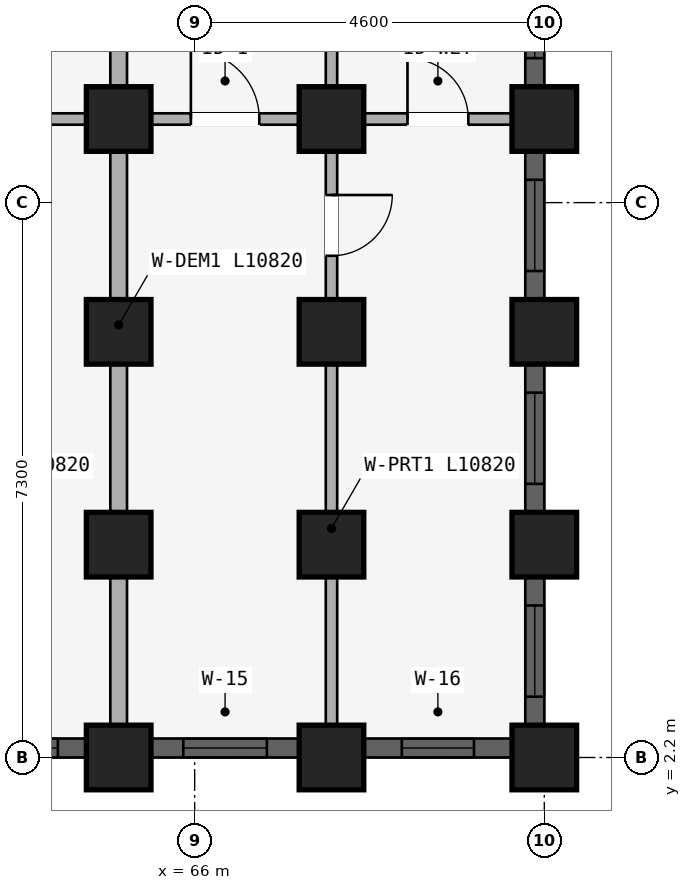
"""IFC4 building model, lengths in metres.
Left out: names, types, materials, properties, quantities, classifications, styles, units other than length and angle.
Written with IfcOpenShell. Run it as: python <this file> out.ifc"""

import sys

from ifc_helpers import new_model, si_unit, direction, frame, frame_2d, origin, origin_2d, place, context, subcontext, project, spatial, rectangle, extrude, element, fill, save


model = new_model("IFC4")
c1 = context("Model", 3, precision=1e-05, world=origin(), true_north=direction((0.0, 1.0)))
c2 = subcontext(c1, "Body", "Model", "MODEL_VIEW")
j1 = project(units=[si_unit("LENGTHUNIT", "METRE"), si_unit("PLANEANGLEUNIT", "RADIAN")], contexts=[c1])
p1 = place(None, origin())
s1 = spatial("IfcSite", under=j1, at=p1, CompositionType="ELEMENT")
p2 = place(p1, origin())
s2 = spatial("IfcBuilding", under=s1, at=p2, CompositionType="ELEMENT")
p3 = place(p2, frame((0.0, 0.0, 4.5)))
s3 = spatial("IfcBuildingStorey", under=s2, at=p3, CompositionType="ELEMENT", Elevation=4.5)
for number, where, z_axis, x_axis in (
    (1, (65.0, 10.6, 0.0), (0.0, 0.0, 1.0), (1.0, 0.0, 0.0)),
    (2, (65.0, 7.8, 0.0), (0.0, 0.0, 1.0), (1.0, 0.0, 0.0)),
    (3, (65.0, 5.0, 0.0), (0.0, 0.0, 1.0), (1.0, 0.0, 0.0)),
    (4, (65.0, 2.2, 0.0), (0.0, 0.0, 1.0), (1.0, 0.0, 0.0)),
    (5, (67.8, 10.6, 0.0), (0.0, 0.0, 1.0), (1.0, 0.0, 0.0)),
    (6, (67.8, 7.8, 0.0), (0.0, 0.0, 1.0), (1.0, 0.0, 0.0)),
    (7, (67.8, 5.0, 0.0), (0.0, 0.0, 1.0), (1.0, 0.0, 0.0)),
    (8, (67.8, 2.2, 0.0), (0.0, 0.0, 1.0), (1.0, 0.0, 0.0)),
    (9, (70.6, 10.6, 0.0), (0.0, 0.0, 1.0), (1.0, 0.0, 0.0)),
    (10, (70.6, 7.8, 0.0), (0.0, 0.0, 1.0), (1.0, 0.0, 0.0)),
    (11, (70.6, 5.0, 0.0), (0.0, 0.0, 1.0), (1.0, 0.0, 0.0)),
    (12, (70.6, 2.2, 0.0), (0.0, 0.0, 1.0), (1.0, 0.0, 0.0)),
):
    element("IfcColumn", number, at=place(p3, frame(where, z_axis=z_axis, x_axis=x_axis)), inside=s3, PredefinedType="COLUMN", context=c2, shape_type="SweptSolid", body=[
        extrude(rectangle(XDim=0.85, YDim=0.85, at=origin_2d()), origin(), (0.0, 0.0, 1.0), 3.98),
    ])
p4 = place(p3, frame((62.28, 10.6, 0.0), z_axis=(0.0, 0.0, 1.0), x_axis=(1.0, 0.0, 0.0)))
e13 = element("IfcWall", 13, at=p4, inside=s3, PredefinedType="PLUMBINGWALL", context=c2, shape_type="SweptSolid", body=[
    extrude(rectangle(XDim=2.64, YDim=0.15, at=frame_2d((1.32, 0.0))), origin(), (0.0, 0.0, 1.0), 3.322),
])
p5 = place(p4, frame((0.92, 0.0, 0.0)))
e14 = element("IfcOpeningElement", 14, at=p5, cuts=e13, PredefinedType="OPENING", context=c2, shape_type="SweptSolid", body=[
    extrude(rectangle(XDim=0.8, YDim=2.1, at=frame_2d((0.4, 1.05))), frame((0.0, 0.085, 0.0), z_axis=(0.0, -1.0, 0.0), x_axis=(1.0, 0.0, 0.0)), (0.0, 0.0, 1.0), 0.17),
])
p6 = place(p3, frame((65.08, 10.6, 0.0), z_axis=(0.0, 0.0, 1.0), x_axis=(1.0, 0.0, 0.0)))
e15 = element("IfcWall", 15, at=p6, inside=s3, PredefinedType="PLUMBINGWALL", context=c2, shape_type="SweptSolid", body=[
    extrude(rectangle(XDim=2.64, YDim=0.15, at=frame_2d((1.32, 0.0))), origin(), (0.0, 0.0, 1.0), 3.322),
])
p7 = place(p6, frame((0.87, 0.0, 0.0)))
e16 = element("IfcOpeningElement", 16, at=p7, cuts=e15, PredefinedType="OPENING", context=c2, shape_type="SweptSolid", body=[
    extrude(rectangle(XDim=0.9, YDim=2.1, at=frame_2d((0.45, 1.05))), frame((0.0, 0.085, 0.0), z_axis=(0.0, -1.0, 0.0), x_axis=(1.0, 0.0, 0.0)), (0.0, 0.0, 1.0), 0.17),
])
p8 = place(p3, frame((67.88, 10.6, 0.0), z_axis=(0.0, 0.0, 1.0), x_axis=(1.0, 0.0, 0.0)))
e17 = element("IfcWall", 17, at=p8, inside=s3, PredefinedType="PLUMBINGWALL", context=c2, shape_type="SweptSolid", body=[
    extrude(rectangle(XDim=2.64, YDim=0.15, at=frame_2d((1.32, 0.0))), origin(), (0.0, 0.0, 1.0), 3.322),
])
p9 = place(p8, frame((0.92, 0.0, 0.0)))
e18 = element("IfcOpeningElement", 18, at=p9, cuts=e17, PredefinedType="OPENING", context=c2, shape_type="SweptSolid", body=[
    extrude(rectangle(XDim=0.8, YDim=2.1, at=frame_2d((0.4, 1.05))), frame((0.0, 0.085, 0.0), z_axis=(0.0, -1.0, 0.0), x_axis=(1.0, 0.0, 0.0)), (0.0, 0.0, 1.0), 0.17),
])
p10 = place(p3, frame((65.0, 13.3, 0.0), z_axis=(0.0, 0.0, 1.0), x_axis=(0.0, -1.0, 0.0)))
e19 = element("IfcWall", 19, at=p10, inside=s3, PredefinedType="STANDARD", context=c2, shape_type="SweptSolid", body=[
    extrude(rectangle(XDim=10.82, YDim=0.22, at=frame_2d((5.41, 0.0))), origin(), (0.0, 0.0, 1.0), 3.322),
])
p11 = place(p3, frame((67.8, 13.3, 0.0), z_axis=(0.0, 0.0, 1.0), x_axis=(0.0, -1.0, 0.0)))
e20 = element("IfcWall", 20, at=p11, inside=s3, PredefinedType="PARTITIONING", context=c2, shape_type="SweptSolid", body=[
    extrude(rectangle(XDim=10.82, YDim=0.15, at=frame_2d((5.41, 0.0))), origin(), (0.0, 0.0, 1.0), 3.322),
])
p12 = place(p11, frame((3.7, 0.0, 0.0)))
e21 = element("IfcOpeningElement", 21, at=p12, cuts=e20, PredefinedType="OPENING", context=c2, shape_type="SweptSolid", body=[
    extrude(rectangle(XDim=0.8, YDim=2.1, at=frame_2d((0.4, 1.05))), frame((0.0, 0.085, 0.0), z_axis=(0.0, -1.0, 0.0), x_axis=(1.0, 0.0, 0.0)), (0.0, 0.0, 1.0), 0.17),
])
p13 = place(p3, frame((62.628, 2.325, 0.0), z_axis=(0.0, 0.0, 1.0), x_axis=(1.0, 0.0, 0.0)))
e22 = element("IfcWall", 22, at=p13, inside=s3, PredefinedType="STANDARD", context=c2, shape_type="SweptSolid", body=[
    extrude(rectangle(XDim=1.943, YDim=0.25, at=frame_2d((0.972, 0.0))), origin(), (0.0, 0.0, 1.0), 3.522),
])
p14 = place(p13, frame((0.372, 0.0, 0.88)))
e23 = element("IfcOpeningElement", 23, at=p14, cuts=e22, PredefinedType="OPENING", context=c2, shape_type="SweptSolid", body=[
    extrude(rectangle(XDim=1.2, YDim=1.5, at=frame_2d((0.6, 0.75))), frame((0.0, 0.135, 0.0), z_axis=(0.0, -1.0, 0.0), x_axis=(1.0, 0.0, 0.0)), (0.0, 0.0, 1.0), 0.27),
])
p15 = place(p3, frame((65.428, 2.325, 0.0), z_axis=(0.0, 0.0, 1.0), x_axis=(1.0, 0.0, 0.0)))
e24 = element("IfcWall", 24, at=p15, inside=s3, PredefinedType="STANDARD", context=c2, shape_type="SweptSolid", body=[
    extrude(rectangle(XDim=1.943, YDim=0.25, at=frame_2d((0.972, 0.0))), origin(), (0.0, 0.0, 1.0), 3.522),
])
p16 = place(p15, frame((0.421, 0.0, 0.88)))
e25 = element("IfcOpeningElement", 25, at=p16, cuts=e24, PredefinedType="OPENING", context=c2, shape_type="SweptSolid", body=[
    extrude(rectangle(XDim=1.1, YDim=1.45, at=frame_2d((0.55, 0.725))), frame((0.0, 0.135, 0.0), z_axis=(0.0, -1.0, 0.0), x_axis=(1.0, 0.0, 0.0)), (0.0, 0.0, 1.0), 0.27),
])
p17 = place(p3, frame((68.229, 2.325, 0.0), z_axis=(0.0, 0.0, 1.0), x_axis=(1.0, 0.0, 0.0)))
e26 = element("IfcWall", 26, at=p17, inside=s3, PredefinedType="STANDARD", context=c2, shape_type="SweptSolid", body=[
    extrude(rectangle(XDim=1.943, YDim=0.25, at=frame_2d((0.971, 0.0))), origin(), (0.0, 0.0, 1.0), 3.522),
])
p18 = place(p17, frame((0.497, 0.0, 0.88)))
e27 = element("IfcOpeningElement", 27, at=p18, cuts=e26, PredefinedType="OPENING", context=c2, shape_type="SweptSolid", body=[
    extrude(rectangle(XDim=0.95, YDim=1.35, at=frame_2d((0.475, 0.675))), frame((0.0, 0.135, 0.0), z_axis=(0.0, -1.0, 0.0), x_axis=(1.0, 0.0, 0.0)), (0.0, 0.0, 1.0), 0.27),
])
p19 = place(p3, frame((70.475, 12.98, 0.0), z_axis=(0.0, 0.0, 1.0), x_axis=(0.0, -1.0, 0.0)))
e28 = element("IfcWall", 28, at=p19, inside=s3, PredefinedType="STANDARD", context=c2, shape_type="SweptSolid", body=[
    extrude(rectangle(XDim=1.96, YDim=0.25, at=frame_2d((0.98, 0.0))), origin(), (0.0, 0.0, 1.0), 3.322),
])
p20 = place(p19, frame((0.38, 0.0, 0.88)))
e29 = element("IfcOpeningElement", 29, at=p20, cuts=e28, PredefinedType="OPENING", context=c2, shape_type="SweptSolid", body=[
    extrude(rectangle(XDim=1.2, YDim=1.5, at=frame_2d((0.6, 0.75))), frame((0.0, 0.135, 0.0), z_axis=(0.0, -1.0, 0.0), x_axis=(1.0, 0.0, 0.0)), (0.0, 0.0, 1.0), 0.27),
])
p21 = place(p3, frame((70.475, 10.18, 0.0), z_axis=(0.0, 0.0, 1.0), x_axis=(0.0, -1.0, 0.0)))
e30 = element("IfcWall", 30, at=p21, inside=s3, PredefinedType="STANDARD", context=c2, shape_type="SweptSolid", body=[
    extrude(rectangle(XDim=1.96, YDim=0.25, at=frame_2d((0.98, 0.0))), origin(), (0.0, 0.0, 1.0), 3.322),
])
p22 = place(p21, frame((0.38, 0.0, 0.88)))
e31 = element("IfcOpeningElement", 31, at=p22, cuts=e30, PredefinedType="OPENING", context=c2, shape_type="SweptSolid", body=[
    extrude(rectangle(XDim=1.2, YDim=1.5, at=frame_2d((0.6, 0.75))), frame((0.0, 0.135, 0.0), z_axis=(0.0, -1.0, 0.0), x_axis=(1.0, 0.0, 0.0)), (0.0, 0.0, 1.0), 0.27),
])
p23 = place(p3, frame((70.475, 7.38, 0.0), z_axis=(0.0, 0.0, 1.0), x_axis=(0.0, -1.0, 0.0)))
e32 = element("IfcWall", 32, at=p23, inside=s3, PredefinedType="STANDARD", context=c2, shape_type="SweptSolid", body=[
    extrude(rectangle(XDim=1.96, YDim=0.25, at=frame_2d((0.98, 0.0))), origin(), (0.0, 0.0, 1.0), 3.322),
])
p24 = place(p23, frame((0.38, 0.0, 0.88)))
e33 = element("IfcOpeningElement", 33, at=p24, cuts=e32, PredefinedType="OPENING", context=c2, shape_type="SweptSolid", body=[
    extrude(rectangle(XDim=1.2, YDim=1.5, at=frame_2d((0.6, 0.75))), frame((0.0, 0.135, 0.0), z_axis=(0.0, -1.0, 0.0), x_axis=(1.0, 0.0, 0.0)), (0.0, 0.0, 1.0), 0.27),
])
p25 = place(p3, frame((70.475, 4.58, 0.0), z_axis=(0.0, 0.0, 1.0), x_axis=(0.0, -1.0, 0.0)))
e34 = element("IfcWall", 34, at=p25, inside=s3, PredefinedType="STANDARD", context=c2, shape_type="SweptSolid", body=[
    extrude(rectangle(XDim=1.96, YDim=0.25, at=frame_2d((0.98, 0.0))), origin(), (0.0, 0.0, 1.0), 3.322),
])
p26 = place(p25, frame((0.38, 0.0, 0.88)))
e35 = element("IfcOpeningElement", 35, at=p26, cuts=e34, PredefinedType="OPENING", context=c2, shape_type="SweptSolid", body=[
    extrude(rectangle(XDim=1.2, YDim=1.5, at=frame_2d((0.6, 0.75))), frame((0.0, 0.135, 0.0), z_axis=(0.0, -1.0, 0.0), x_axis=(1.0, 0.0, 0.0)), (0.0, 0.0, 1.0), 0.27),
])
p27 = place(p14, origin())
e36 = element("IfcWindow", 36, at=p27, inside=s3, PartitioningType="SINGLE_PANEL", PredefinedType="WINDOW", context=c2, shape_type="SweptSolid", body=[
    extrude(rectangle(XDim=1.2, YDim=1.5, at=frame_2d((0.6, 0.75))), frame((0.0, 0.03, 0.0), z_axis=(0.0, -1.0, 0.0), x_axis=(1.0, 0.0, 0.0)), (0.0, 0.0, 1.0), 0.06),
])
fill(e23, e36)
p28 = place(p16, origin())
e37 = element("IfcWindow", 37, at=p28, inside=s3, PartitioningType="SINGLE_PANEL", PredefinedType="WINDOW", context=c2, shape_type="SweptSolid", body=[
    extrude(rectangle(XDim=1.1, YDim=1.45, at=frame_2d((0.55, 0.725))), frame((0.0, 0.03, 0.0), z_axis=(0.0, -1.0, 0.0), x_axis=(1.0, 0.0, 0.0)), (0.0, 0.0, 1.0), 0.06),
])
fill(e25, e37)
p29 = place(p18, origin())
e38 = element("IfcWindow", 38, at=p29, inside=s3, PartitioningType="SINGLE_PANEL", PredefinedType="WINDOW", context=c2, shape_type="SweptSolid", body=[
    extrude(rectangle(XDim=0.95, YDim=1.35, at=frame_2d((0.475, 0.675))), frame((0.0, 0.03, 0.0), z_axis=(0.0, -1.0, 0.0), x_axis=(1.0, 0.0, 0.0)), (0.0, 0.0, 1.0), 0.06),
])
fill(e27, e38)
p30 = place(p20, origin())
e39 = element("IfcWindow", 39, at=p30, inside=s3, PartitioningType="SINGLE_PANEL", PredefinedType="WINDOW", context=c2, shape_type="SweptSolid", body=[
    extrude(rectangle(XDim=1.2, YDim=1.5, at=frame_2d((0.6, 0.75))), frame((0.0, 0.03, 0.0), z_axis=(0.0, -1.0, 0.0), x_axis=(1.0, 0.0, 0.0)), (0.0, 0.0, 1.0), 0.06),
])
fill(e29, e39)
p31 = place(p22, origin())
e40 = element("IfcWindow", 40, at=p31, inside=s3, PartitioningType="SINGLE_PANEL", PredefinedType="WINDOW", context=c2, shape_type="SweptSolid", body=[
    extrude(rectangle(XDim=1.2, YDim=1.5, at=frame_2d((0.6, 0.75))), frame((0.0, 0.03, 0.0), z_axis=(0.0, -1.0, 0.0), x_axis=(1.0, 0.0, 0.0)), (0.0, 0.0, 1.0), 0.06),
])
fill(e31, e40)
p32 = place(p24, origin())
e41 = element("IfcWindow", 41, at=p32, inside=s3, PartitioningType="SINGLE_PANEL", PredefinedType="WINDOW", context=c2, shape_type="SweptSolid", body=[
    extrude(rectangle(XDim=1.2, YDim=1.5, at=frame_2d((0.6, 0.75))), frame((0.0, 0.03, 0.0), z_axis=(0.0, -1.0, 0.0), x_axis=(1.0, 0.0, 0.0)), (0.0, 0.0, 1.0), 0.06),
])
fill(e33, e41)
p33 = place(p26, origin())
e42 = element("IfcWindow", 42, at=p33, inside=s3, PartitioningType="SINGLE_PANEL", PredefinedType="WINDOW", context=c2, shape_type="SweptSolid", body=[
    extrude(rectangle(XDim=1.2, YDim=1.5, at=frame_2d((0.6, 0.75))), frame((0.0, 0.03, 0.0), z_axis=(0.0, -1.0, 0.0), x_axis=(1.0, 0.0, 0.0)), (0.0, 0.0, 1.0), 0.06),
])
fill(e35, e42)
p34 = place(p7, frame((0.9, 0.0, 0.0), z_axis=(0.0, 0.0, 1.0), x_axis=(-1.0, 0.0, 0.0)))
e43 = element("IfcDoor", 43, at=p34, inside=s3, OperationType="SINGLE_SWING_RIGHT", PredefinedType="DOOR", context=c2, shape_type="SweptSolid", body=[
    extrude(rectangle(XDim=0.9, YDim=2.1, at=frame_2d((0.45, 1.05))), frame((0.0, 0.025, 0.0), z_axis=(0.0, -1.0, 0.0), x_axis=(1.0, 0.0, 0.0)), (0.0, 0.0, 1.0), 0.05),
])
fill(e16, e43)
p35 = place(p9, frame((0.8, 0.0, 0.0), z_axis=(0.0, 0.0, 1.0), x_axis=(-1.0, 0.0, 0.0)))
e44 = element("IfcDoor", 44, at=p35, inside=s3, OperationType="SINGLE_SWING_RIGHT", PredefinedType="DOOR", context=c2, shape_type="SweptSolid", body=[
    extrude(rectangle(XDim=0.8, YDim=2.1, at=frame_2d((0.4, 1.05))), frame((0.0, 0.025, 0.0), z_axis=(0.0, -1.0, 0.0), x_axis=(1.0, 0.0, 0.0)), (0.0, 0.0, 1.0), 0.05),
])
fill(e18, e44)
p36 = place(p12, origin())
e45 = element("IfcDoor", 45, at=p36, inside=s3, OperationType="SINGLE_SWING_LEFT", PredefinedType="DOOR", context=c2, shape_type="SweptSolid", body=[
    extrude(rectangle(XDim=0.8, YDim=2.1, at=frame_2d((0.4, 1.05))), frame((0.0, 0.025, 0.0), z_axis=(0.0, -1.0, 0.0), x_axis=(1.0, 0.0, 0.0)), (0.0, 0.0, 1.0), 0.05),
])
fill(e21, e45)
save(model, sys.argv[1])
